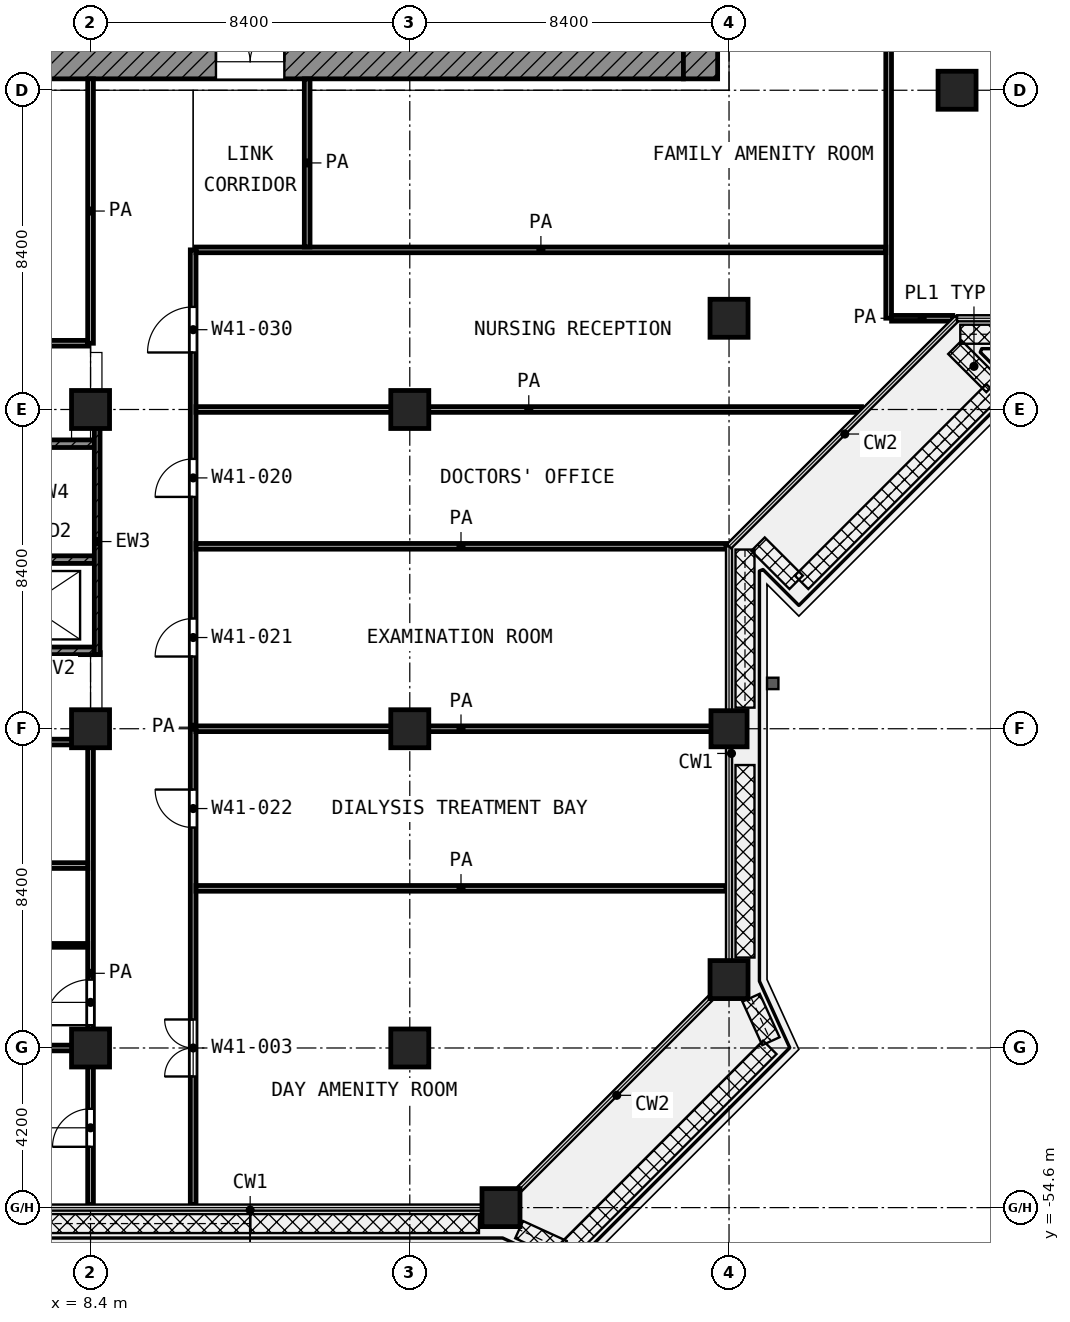
"""IFC4 building model, lengths in metres.
Left out: names, types, materials, properties, quantities, classifications, styles, units other than length and angle.
Written with IfcOpenShell. Run it as: python <this file> out.ifc"""

import sys

from ifc_helpers import new_model, si_unit, direction, frame, frame_2d, origin, origin_2d, place, context, subcontext, project, spatial, rectangle, extrude, element, fill, save


model = new_model("IFC4")
c1 = context("Model", 3, precision=1e-05, world=origin(), true_north=direction((0.0, 1.0)))
c2 = subcontext(c1, "Body", "Model", "MODEL_VIEW")
j1 = project(units=[si_unit("LENGTHUNIT", "METRE"), si_unit("PLANEANGLEUNIT", "RADIAN")], contexts=[c1])
p1 = place(None, origin())
s1 = spatial("IfcSite", under=j1, at=p1, CompositionType="ELEMENT")
p2 = place(p1, origin())
s2 = spatial("IfcBuilding", under=s1, at=p2, CompositionType="ELEMENT")
p3 = place(p2, frame((0.0, 0.0, 200.4)))
s3 = spatial("IfcBuildingStorey", under=s2, at=p3, CompositionType="ELEMENT", Elevation=200.4)
for number, where, z_axis, x_axis in (
    (1, (31.2, -25.2, 0.0), (0.0, 0.0, 1.0), (1.0, 0.0, 0.0)),
    (2, (25.2, -31.2, 0.0), (0.0, 0.0, 1.0), (1.0, 0.0, 0.0)),
    (3, (8.4, -33.6, 0.0), (0.0, 0.0, 1.0), (1.0, 0.0, 0.0)),
    (4, (16.8, -33.6, 0.0), (0.0, 0.0, 1.0), (1.0, 0.0, 0.0)),
    (5, (8.4, -42.0, 0.0), (0.0, 0.0, 1.0), (1.0, 0.0, 0.0)),
    (6, (16.8, -42.0, 0.0), (0.0, 0.0, 1.0), (1.0, 0.0, 0.0)),
):
    element("IfcColumn", number, at=place(p3, frame(where, z_axis=z_axis, x_axis=x_axis)), inside=s3, PredefinedType="COLUMN", context=c2, shape_type="SweptSolid", body=[
        extrude(rectangle(XDim=1.0, YDim=1.0, at=origin_2d()), origin(), (0.0, 0.0, 1.0), 4.2),
    ])
p4 = place(p3, frame((25.2, -42.0, 0.0), z_axis=(0.0, 0.0, 1.0), x_axis=(1.0, 0.0, 0.0)))
e7 = element("IfcColumn", 7, at=p4, inside=s3, PredefinedType="COLUMN", context=c2, shape_type="SweptSolid", body=[
    extrude(rectangle(XDim=0.95, YDim=0.95, at=origin_2d()), origin(), (0.0, 0.0, 1.0), 4.2),
])
for number, where, z_axis, x_axis in (
    (8, (25.2, -48.6, 0.0), (0.0, 0.0, 1.0), (1.0, 0.0, 0.0)),
    (9, (8.4, -50.4, 0.0), (0.0, 0.0, 1.0), (1.0, 0.0, 0.0)),
    (10, (16.8, -50.4, 0.0), (0.0, 0.0, 1.0), (1.0, 0.0, 0.0)),
    (11, (19.2, -54.6, 0.0), (0.0, 0.0, 1.0), (1.0, 0.0, 0.0)),
):
    element("IfcColumn", number, at=place(p3, frame(where, z_axis=z_axis, x_axis=x_axis)), inside=s3, PredefinedType="COLUMN", context=c2, shape_type="SweptSolid", body=[
        extrude(rectangle(XDim=1.0, YDim=1.0, at=origin_2d()), origin(), (0.0, 0.0, 1.0), 4.2),
    ])
p5 = place(p3, frame((5.4, -24.45, 0.0), z_axis=(0.0, 0.0, 1.0), x_axis=(1.0, 0.0, 0.0)))
e12 = element("IfcWall", 12, at=p5, inside=s3, PredefinedType="SHEAR", context=c2, shape_type="SweptSolid", body=[
    extrude(rectangle(XDim=18.6, YDim=0.9, at=frame_2d((9.3, 0.0))), origin(), (0.0, 0.0, 1.0), 3.6),
])
p6 = place(p5, frame((6.3, 0.0, 0.0)))
e13 = element("IfcOpeningElement", 13, at=p6, cuts=e12, PredefinedType="OPENING", context=c2, shape_type="SweptSolid", body=[
    extrude(rectangle(XDim=1.8, YDim=2.1, at=frame_2d((0.9, 1.05))), frame((0.0, 0.46, 0.0), z_axis=(0.0, -1.0, 0.0), x_axis=(1.0, 0.0, 0.0)), (0.0, 0.0, 1.0), 0.92),
])
p7 = place(p3, frame((24.45, -24.9, 0.0), z_axis=(0.0, 0.0, 1.0), x_axis=(0.0, 1.0, 0.0)))
e14 = element("IfcWall", 14, at=p7, inside=s3, PredefinedType="SHEAR", context=c2, shape_type="SweptSolid", body=[
    extrude(rectangle(XDim=0.9, YDim=0.9, at=frame_2d((0.45, 0.0))), origin(), (0.0, 0.0, 1.0), 3.6),
])
p8 = place(p3, frame((8.575, -40.05, 0.0), z_axis=(0.0, 0.0, 1.0), x_axis=(0.0, 1.0, 0.0)))
e15 = element("IfcWall", 15, at=p8, inside=s3, PredefinedType="SHEAR", context=c2, shape_type="SweptSolid", body=[
    extrude(rectangle(XDim=5.95, YDim=0.15, at=frame_2d((2.975, 0.0))), origin(), (0.0, 0.0, 1.0), 3.6),
])
p9 = place(p3, frame((0.45, -34.5, 0.0), z_axis=(0.0, 0.0, 1.0), x_axis=(1.0, 0.0, 0.0)))
e16 = element("IfcWall", 16, at=p9, inside=s3, PredefinedType="SHEAR", context=c2, shape_type="SweptSolid", body=[
    extrude(rectangle(XDim=8.05, YDim=0.2, at=frame_2d((4.025, 0.0))), origin(), (0.0, 0.0, 1.0), 3.6),
])
p10 = place(p9, frame((0.75, 0.0, 0.0)))
e17 = element("IfcOpeningElement", 17, at=p10, cuts=e16, PredefinedType="OPENING", context=c2, shape_type="SweptSolid", body=[
    extrude(rectangle(XDim=1.1, YDim=2.1, at=frame_2d((0.55, 1.05))), frame((0.0, 0.11, 0.0), z_axis=(0.0, -1.0, 0.0), x_axis=(1.0, 0.0, 0.0)), (0.0, 0.0, 1.0), 0.22),
])
p11 = place(p3, frame((0.45, -37.55, 0.0), z_axis=(0.0, 0.0, 1.0), x_axis=(1.0, 0.0, 0.0)))
e18 = element("IfcWall", 18, at=p11, inside=s3, PredefinedType="SHEAR", context=c2, shape_type="SweptSolid", body=[
    extrude(rectangle(XDim=8.05, YDim=0.2, at=frame_2d((4.025, 0.0))), origin(), (0.0, 0.0, 1.0), 3.6),
])
p12 = place(p11, frame((0.1, 0.0, 0.0)))
e19 = element("IfcOpeningElement", 19, at=p12, cuts=e18, PredefinedType="OPENING", context=c2, shape_type="SweptSolid", body=[
    extrude(rectangle(XDim=1.1, YDim=2.1, at=frame_2d((0.55, 1.05))), frame((0.0, 0.11, 0.0), z_axis=(0.0, -1.0, 0.0), x_axis=(1.0, 0.0, 0.0)), (0.0, 0.0, 1.0), 0.22),
])
p13 = place(p3, frame((0.45, -39.95, 0.0), z_axis=(0.0, 0.0, 1.0), x_axis=(1.0, 0.0, 0.0)))
e20 = element("IfcWall", 20, at=p13, inside=s3, PredefinedType="SHEAR", context=c2, shape_type="SweptSolid", body=[
    extrude(rectangle(XDim=8.05, YDim=0.2, at=frame_2d((4.025, 0.0))), origin(), (0.0, 0.0, 1.0), 3.6),
])
p14 = place(p13, frame((2.0, 0.0, 0.0)))
e21 = element("IfcOpeningElement", 21, at=p14, cuts=e20, PredefinedType="OPENING", context=c2, shape_type="SweptSolid", body=[
    extrude(rectangle(XDim=1.1, YDim=2.1, at=frame_2d((0.55, 1.05))), frame((0.0, 0.11, 0.0), z_axis=(0.0, -1.0, 0.0), x_axis=(1.0, 0.0, 0.0)), (0.0, 0.0, 1.0), 0.22),
])
p15 = place(p3, frame((5.75, -47.7, 0.0), z_axis=(0.0, 0.0, 1.0), x_axis=(1.0, 0.0, 0.0)))
e22 = element("IfcWall", 22, at=p15, inside=s3, PredefinedType="PARTITIONING", context=c2, shape_type="SweptSolid", body=[
    extrude(rectangle(XDim=2.575, YDim=0.1, at=frame_2d((1.288, 0.0))), origin(), (0.0, 0.0, 1.0), 3.6),
])
p16 = place(p3, frame((1.913, -50.4, 0.0), z_axis=(0.0, 0.0, 1.0), x_axis=(1.0, 0.0, 0.0)))
e23 = element("IfcWall", 23, at=p16, inside=s3, PredefinedType="PARTITIONING", context=c2, shape_type="SweptSolid", body=[
    extrude(rectangle(XDim=6.412, YDim=0.15, at=frame_2d((3.206, 0.0))), origin(), (0.0, 0.0, 1.0), 3.6),
])
p17 = place(p3, frame((11.175, -46.2, 0.0), z_axis=(0.0, 0.0, 1.0), x_axis=(1.0, 0.0, 0.0)))
e24 = element("IfcWall", 24, at=p17, inside=s3, PredefinedType="PARTITIONING", context=c2, shape_type="SweptSolid", body=[
    extrude(rectangle(XDim=13.945, YDim=0.15, at=frame_2d((6.973, 0.0))), origin(), (0.0, 0.0, 1.0), 3.6),
])
p18 = place(p3, frame((0.08, -45.6, 0.0), z_axis=(0.0, 0.0, 1.0), x_axis=(1.0, 0.0, 0.0)))
e25 = element("IfcWall", 25, at=p18, inside=s3, PredefinedType="PARTITIONING", context=c2, shape_type="SweptSolid", body=[
    extrude(rectangle(XDim=8.245, YDim=0.15, at=frame_2d((4.123, 0.0))), origin(), (0.0, 0.0, 1.0), 3.6),
])
p19 = place(p3, frame((2.327, -42.35, 0.0), z_axis=(0.0, 0.0, 1.0), x_axis=(1.0, 0.0, 0.0)))
e26 = element("IfcWall", 26, at=p19, inside=s3, PredefinedType="PARTITIONING", context=c2, shape_type="SweptSolid", body=[
    extrude(rectangle(XDim=5.998, YDim=0.15, at=frame_2d((2.999, 0.0))), origin(), (0.0, 0.0, 1.0), 3.6),
])
p20 = place(p19, frame((2.499, 0.0, 0.0)))
e27 = element("IfcOpeningElement", 27, at=p20, cuts=e26, PredefinedType="OPENING", context=c2, shape_type="SweptSolid", body=[
    extrude(rectangle(XDim=1.0, YDim=2.1, at=frame_2d((0.5, 1.05))), frame((0.0, 0.085, 0.0), z_axis=(0.0, -1.0, 0.0), x_axis=(1.0, 0.0, 0.0)), (0.0, 0.0, 1.0), 0.17),
])
for number, where, z_axis, x_axis in (
    (28, (11.175, -42.0, 0.0), (0.0, 0.0, 1.0), (1.0, 0.0, 0.0)),
    (29, (11.175, -37.2, 0.0), (0.0, 0.0, 1.0), (1.0, 0.0, 0.0)),
):
    element("IfcWall", number, at=place(p3, frame(where, z_axis=z_axis, x_axis=x_axis)), inside=s3, PredefinedType="PARTITIONING", context=c2, shape_type="SweptSolid", body=[
        extrude(rectangle(XDim=13.945, YDim=0.15, at=frame_2d((6.973, 0.0))), origin(), (0.0, 0.0, 1.0), 3.6),
    ])
p21 = place(p3, frame((11.175, -33.6, 0.0), z_axis=(0.0, 0.0, 1.0), x_axis=(1.0, 0.0, 0.0)))
e30 = element("IfcWall", 30, at=p21, inside=s3, PredefinedType="PARTITIONING", context=c2, shape_type="SweptSolid", body=[
    extrude(rectangle(XDim=17.512, YDim=0.15, at=frame_2d((8.756, 0.0))), origin(), (0.0, 0.0, 1.0), 3.6),
])
p22 = place(p3, frame((1.077, -31.857, 0.0), z_axis=(0.0, 0.0, 1.0), x_axis=(1.0, 0.0, 0.0)))
e31 = element("IfcWall", 31, at=p22, inside=s3, PredefinedType="PARTITIONING", context=c2, shape_type="SweptSolid", body=[
    extrude(rectangle(XDim=7.248, YDim=0.15, at=frame_2d((3.624, 0.0))), origin(), (0.0, 0.0, 1.0), 3.6),
])
p23 = place(p22, frame((3.024, 0.0, 0.0)))
e32 = element("IfcOpeningElement", 32, at=p23, cuts=e31, PredefinedType="OPENING", context=c2, shape_type="SweptSolid", body=[
    extrude(rectangle(XDim=1.2, YDim=2.1, at=frame_2d((0.6, 1.05))), frame((0.0, 0.085, 0.0), z_axis=(0.0, -1.0, 0.0), x_axis=(1.0, 0.0, 0.0)), (0.0, 0.0, 1.0), 0.17),
])
p24 = place(p3, frame((29.477, -31.2, 0.0), z_axis=(0.0, 0.0, 1.0), x_axis=(1.0, 0.0, 0.0)))
e33 = element("IfcWall", 33, at=p24, inside=s3, PredefinedType="PARTITIONING", context=c2, shape_type="SweptSolid", body=[
    extrude(rectangle(XDim=1.61, YDim=0.15, at=frame_2d((0.805, 0.0))), origin(), (0.0, 0.0, 1.0), 3.6),
])
p25 = place(p3, frame((11.175, -29.4, 0.0), z_axis=(0.0, 0.0, 1.0), x_axis=(1.0, 0.0, 0.0)))
e34 = element("IfcWall", 34, at=p25, inside=s3, PredefinedType="PARTITIONING", context=c2, shape_type="SweptSolid", body=[
    extrude(rectangle(XDim=18.15, YDim=0.15, at=frame_2d((9.075, 0.0))), origin(), (0.0, 0.0, 1.0), 3.6),
])
p26 = place(p3, frame((8.4, -54.52, 0.0), z_axis=(0.0, 0.0, 1.0), x_axis=(0.0, 1.0, 0.0)))
e35 = element("IfcWall", 35, at=p26, inside=s3, PredefinedType="PARTITIONING", context=c2, shape_type="SweptSolid", body=[
    extrude(rectangle(XDim=12.17, YDim=0.15, at=frame_2d((6.085, 0.0))), origin(), (0.0, 0.0, 1.0), 3.6),
])
p27 = place(p26, frame((4.72, 0.0, 0.0)))
e36 = element("IfcOpeningElement", 36, at=p27, cuts=e35, PredefinedType="OPENING", context=c2, shape_type="SweptSolid", body=[
    extrude(rectangle(XDim=1.2, YDim=2.1, at=frame_2d((0.6, 1.05))), frame((0.0, 0.085, 0.0), z_axis=(0.0, -1.0, 0.0), x_axis=(1.0, 0.0, 0.0)), (0.0, 0.0, 1.0), 0.17),
])
p28 = place(p26, frame((1.52, 0.0, 0.0)))
e37 = element("IfcOpeningElement", 37, at=p28, cuts=e35, PredefinedType="OPENING", context=c2, shape_type="SweptSolid", body=[
    extrude(rectangle(XDim=1.0, YDim=2.1, at=frame_2d((0.5, 1.05))), frame((0.0, 0.085, 0.0), z_axis=(0.0, -1.0, 0.0), x_axis=(1.0, 0.0, 0.0)), (0.0, 0.0, 1.0), 0.17),
])
p29 = place(p3, frame((8.4, -31.857, 0.0), z_axis=(0.0, 0.0, 1.0), x_axis=(0.0, 1.0, 0.0)))
e38 = element("IfcWall", 38, at=p29, inside=s3, PredefinedType="PARTITIONING", context=c2, shape_type="SweptSolid", body=[
    extrude(rectangle(XDim=6.957, YDim=0.15, at=frame_2d((3.479, 0.0))), origin(), (0.0, 0.0, 1.0), 3.6),
])
p30 = place(p3, frame((11.1, -54.52, 0.0), z_axis=(0.0, 0.0, 1.0), x_axis=(0.0, 1.0, 0.0)))
e39 = element("IfcWall", 39, at=p30, inside=s3, PredefinedType="PARTITIONING", context=c2, shape_type="SweptSolid", body=[
    extrude(rectangle(XDim=25.12, YDim=0.15, at=frame_2d((12.56, 0.0))), origin(), (0.0, 0.0, 1.0), 3.6),
])
p31 = place(p30, frame((22.42, 0.0, 0.0)))
e40 = element("IfcOpeningElement", 40, at=p31, cuts=e39, PredefinedType="OPENING", context=c2, shape_type="SweptSolid", body=[
    extrude(rectangle(XDim=1.2, YDim=2.1, at=frame_2d((0.6, 1.05))), frame((0.0, 0.085, 0.0), z_axis=(0.0, -1.0, 0.0), x_axis=(1.0, 0.0, 0.0)), (0.0, 0.0, 1.0), 0.17),
])
p32 = place(p30, frame((18.62, 0.0, 0.0)))
e41 = element("IfcOpeningElement", 41, at=p32, cuts=e39, PredefinedType="OPENING", context=c2, shape_type="SweptSolid", body=[
    extrude(rectangle(XDim=1.0, YDim=2.1, at=frame_2d((0.5, 1.05))), frame((0.0, 0.085, 0.0), z_axis=(0.0, -1.0, 0.0), x_axis=(1.0, 0.0, 0.0)), (0.0, 0.0, 1.0), 0.17),
])
p33 = place(p30, frame((14.42, 0.0, 0.0)))
e42 = element("IfcOpeningElement", 42, at=p33, cuts=e39, PredefinedType="OPENING", context=c2, shape_type="SweptSolid", body=[
    extrude(rectangle(XDim=1.0, YDim=2.1, at=frame_2d((0.5, 1.05))), frame((0.0, 0.085, 0.0), z_axis=(0.0, -1.0, 0.0), x_axis=(1.0, 0.0, 0.0)), (0.0, 0.0, 1.0), 0.17),
])
p34 = place(p30, frame((9.92, 0.0, 0.0)))
e43 = element("IfcOpeningElement", 43, at=p34, cuts=e39, PredefinedType="OPENING", context=c2, shape_type="SweptSolid", body=[
    extrude(rectangle(XDim=1.0, YDim=2.1, at=frame_2d((0.5, 1.05))), frame((0.0, 0.085, 0.0), z_axis=(0.0, -1.0, 0.0), x_axis=(1.0, 0.0, 0.0)), (0.0, 0.0, 1.0), 0.17),
])
p35 = place(p30, frame((3.37, 0.0, 0.0)))
e44 = element("IfcOpeningElement", 44, at=p35, cuts=e39, PredefinedType="OPENING", context=c2, shape_type="SweptSolid", body=[
    extrude(rectangle(XDim=1.5, YDim=2.1, at=frame_2d((0.75, 1.05))), frame((0.0, 0.085, 0.0), z_axis=(0.0, -1.0, 0.0), x_axis=(1.0, 0.0, 0.0)), (0.0, 0.0, 1.0), 0.17),
])
p36 = place(p3, frame((14.1, -29.325, 0.0), z_axis=(0.0, 0.0, 1.0), x_axis=(0.0, 1.0, 0.0)))
e45 = element("IfcWall", 45, at=p36, inside=s3, PredefinedType="PARTITIONING", context=c2, shape_type="SweptSolid", body=[
    extrude(rectangle(XDim=4.425, YDim=0.15, at=frame_2d((2.212, 0.0))), origin(), (0.0, 0.0, 1.0), 3.6),
])
p37 = place(p3, frame((29.4, -31.198, 0.0), z_axis=(0.0, 0.0, 1.0), x_axis=(0.0, 1.0, 0.0)))
e46 = element("IfcWall", 46, at=p37, inside=s3, PredefinedType="PARTITIONING", context=c2, shape_type="SweptSolid", body=[
    extrude(rectangle(XDim=20.098, YDim=0.15, at=frame_2d((10.049, 0.0))), origin(), (0.0, 0.0, 1.0), 3.6),
])
p38 = place(p6, origin())
e47 = element("IfcDoor", 47, at=p38, inside=s3, OperationType="DOUBLE_DOOR_SINGLE_SWING", PredefinedType="DOOR", context=c2, shape_type="SweptSolid", body=[
    extrude(rectangle(XDim=1.8, YDim=2.1, at=frame_2d((0.9, 1.05))), frame((0.0, 0.025, 0.0), z_axis=(0.0, -1.0, 0.0), x_axis=(1.0, 0.0, 0.0)), (0.0, 0.0, 1.0), 0.05),
])
fill(e13, e47)
p39 = place(p27, origin())
e48 = element("IfcDoor", 48, at=p39, inside=s3, OperationType="SINGLE_SWING_LEFT", PredefinedType="DOOR", context=c2, shape_type="SweptSolid", body=[
    extrude(rectangle(XDim=1.2, YDim=2.1, at=frame_2d((0.6, 1.05))), frame((0.0, 0.025, 0.0), z_axis=(0.0, -1.0, 0.0), x_axis=(1.0, 0.0, 0.0)), (0.0, 0.0, 1.0), 0.05),
])
fill(e36, e48)
p40 = place(p28, origin())
e49 = element("IfcDoor", 49, at=p40, inside=s3, OperationType="SINGLE_SWING_LEFT", PredefinedType="DOOR", context=c2, shape_type="SweptSolid", body=[
    extrude(rectangle(XDim=1.0, YDim=2.1, at=frame_2d((0.5, 1.05))), frame((0.0, 0.025, 0.0), z_axis=(0.0, -1.0, 0.0), x_axis=(1.0, 0.0, 0.0)), (0.0, 0.0, 1.0), 0.05),
])
fill(e37, e49)
p41 = place(p31, origin())
e50 = element("IfcDoor", 50, at=p41, inside=s3, OperationType="SINGLE_SWING_LEFT", PredefinedType="DOOR", context=c2, shape_type="SweptSolid", body=[
    extrude(rectangle(XDim=1.2, YDim=2.1, at=frame_2d((0.6, 1.05))), frame((0.0, 0.025, 0.0), z_axis=(0.0, -1.0, 0.0), x_axis=(1.0, 0.0, 0.0)), (0.0, 0.0, 1.0), 0.05),
])
fill(e40, e50)
p42 = place(p32, origin())
e51 = element("IfcDoor", 51, at=p42, inside=s3, OperationType="SINGLE_SWING_LEFT", PredefinedType="DOOR", context=c2, shape_type="SweptSolid", body=[
    extrude(rectangle(XDim=1.0, YDim=2.1, at=frame_2d((0.5, 1.05))), frame((0.0, 0.025, 0.0), z_axis=(0.0, -1.0, 0.0), x_axis=(1.0, 0.0, 0.0)), (0.0, 0.0, 1.0), 0.05),
])
fill(e41, e51)
p43 = place(p33, origin())
e52 = element("IfcDoor", 52, at=p43, inside=s3, OperationType="SINGLE_SWING_LEFT", PredefinedType="DOOR", context=c2, shape_type="SweptSolid", body=[
    extrude(rectangle(XDim=1.0, YDim=2.1, at=frame_2d((0.5, 1.05))), frame((0.0, 0.025, 0.0), z_axis=(0.0, -1.0, 0.0), x_axis=(1.0, 0.0, 0.0)), (0.0, 0.0, 1.0), 0.05),
])
fill(e42, e52)
p44 = place(p34, origin())
e53 = element("IfcDoor", 53, at=p44, inside=s3, OperationType="SINGLE_SWING_RIGHT", PredefinedType="DOOR", context=c2, shape_type="SweptSolid", body=[
    extrude(rectangle(XDim=1.0, YDim=2.1, at=frame_2d((0.5, 1.05))), frame((0.0, 0.025, 0.0), z_axis=(0.0, -1.0, 0.0), x_axis=(1.0, 0.0, 0.0)), (0.0, 0.0, 1.0), 0.05),
])
fill(e43, e53)
p45 = place(p35, origin())
e54 = element("IfcDoor", 54, at=p45, inside=s3, OperationType="DOUBLE_DOOR_SINGLE_SWING", PredefinedType="DOOR", context=c2, shape_type="SweptSolid", body=[
    extrude(rectangle(XDim=1.5, YDim=2.1, at=frame_2d((0.75, 1.05))), frame((0.0, 0.025, 0.0), z_axis=(0.0, -1.0, 0.0), x_axis=(1.0, 0.0, 0.0)), (0.0, 0.0, 1.0), 0.05),
])
fill(e44, e54)
save(model, sys.argv[1])
